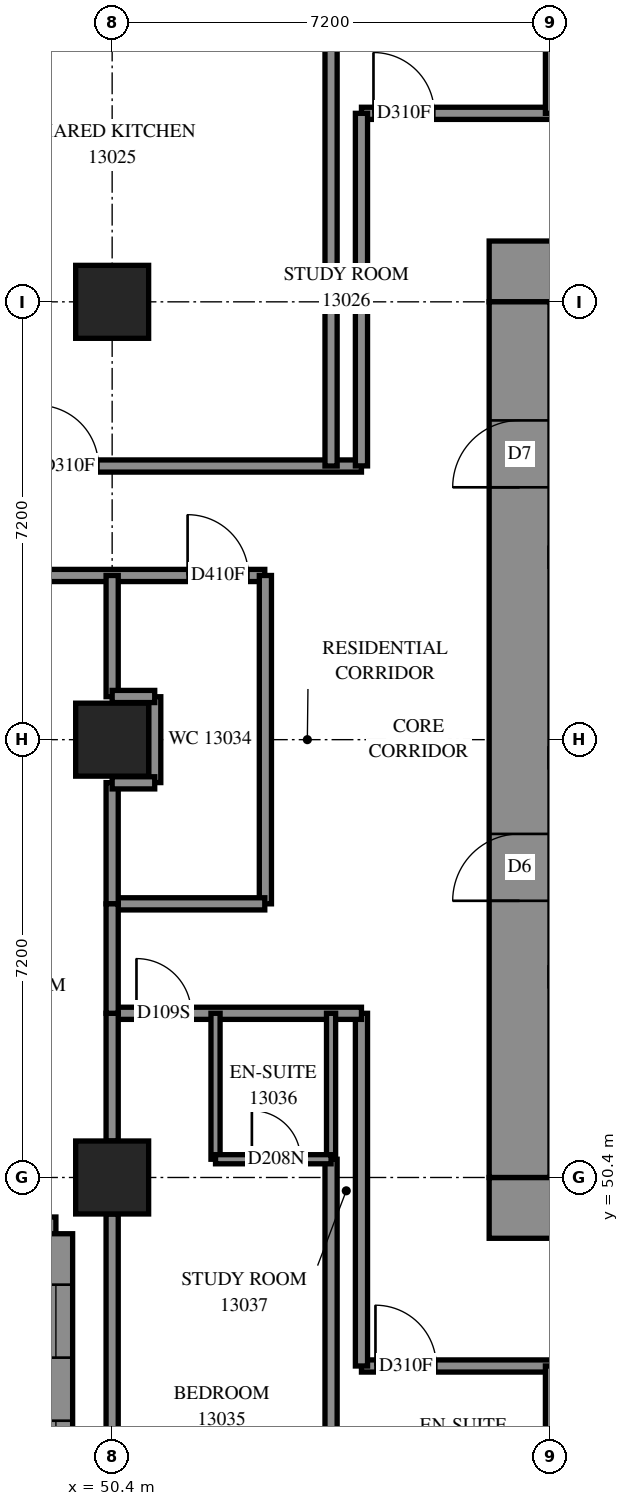
"""IFC4 building model, lengths in metres.
Left out: names, types, materials, properties, quantities, classifications, styles, units other than length and angle.
Written with IfcOpenShell. Run it as: python <this file> out.ifc"""

import sys

from ifc_helpers import new_model, si_unit, direction, frame, frame_2d, origin, origin_2d, place, context, subcontext, project, spatial, polyline, rectangle, outline, extrude, element, fill, save


model = new_model("IFC4")
c1 = context("Model", 3, precision=1e-05, world=origin(), true_north=direction((0.0, 1.0)))
c2 = subcontext(c1, "Body", "Model", "MODEL_VIEW")
j1 = project(units=[si_unit("LENGTHUNIT", "METRE"), si_unit("PLANEANGLEUNIT", "RADIAN")], contexts=[c1])
p1 = place(None, origin())
s1 = spatial("IfcSite", under=j1, at=p1, CompositionType="ELEMENT")
p2 = place(p1, origin())
s2 = spatial("IfcBuilding", under=s1, at=p2, CompositionType="ELEMENT")
p3 = place(p2, frame((0.0, 0.0, 50.8)))
s3 = spatial("IfcBuildingStorey", under=s2, at=p3, CompositionType="ELEMENT", Elevation=50.8)
for number, where, z_axis, x_axis in (
    (1, (50.4, 50.4, 0.0), (0.0, 0.0, 1.0), (1.0, 0.0, 0.0)),
    (2, (50.4, 57.6, 0.0), (0.0, 0.0, 1.0), (1.0, 0.0, 0.0)),
    (3, (50.4, 64.8, 0.0), (0.0, 0.0, 1.0), (1.0, 0.0, 0.0)),
):
    element("IfcColumn", number, at=place(p3, frame(where, z_axis=z_axis, x_axis=x_axis)), inside=s3, PredefinedType="COLUMN", context=c2, shape_type="SweptSolid", body=[
        extrude(rectangle(XDim=1.2, YDim=1.2, at=origin_2d()), origin(), (0.0, 0.0, 1.0), 3.1),
    ])
p4 = place(p3, frame((56.6, 49.9, -0.3), z_axis=(0.0, 0.0, 1.0), x_axis=(1.0, 0.0, 0.0)))
e4 = element("IfcWall", 4, at=p4, inside=s3, PredefinedType="SHEAR", context=c2, shape_type="SweptSolid", body=[
    extrude(rectangle(XDim=16.4, YDim=1.0, at=frame_2d((8.2, 0.0))), origin(), (0.0, 0.0, 1.0), 2.7),
])
p5 = place(p3, frame((56.6, 65.3, -0.3), z_axis=(0.0, 0.0, 1.0), x_axis=(1.0, 0.0, 0.0)))
e5 = element("IfcWall", 5, at=p5, inside=s3, PredefinedType="SHEAR", context=c2, shape_type="SweptSolid", body=[
    extrude(rectangle(XDim=16.4, YDim=1.0, at=frame_2d((8.2, 0.0))), origin(), (0.0, 0.0, 1.0), 2.7),
])
p6 = place(p5, frame((11.0, 0.0, 0.3)))
e6 = element("IfcOpeningElement", 6, at=p6, cuts=e5, PredefinedType="OPENING", context=c2, shape_type="SweptSolid", body=[
    extrude(rectangle(XDim=0.8, YDim=2.1, at=frame_2d((0.4, 1.05))), frame((0.0, 0.51, 0.0), z_axis=(0.0, -1.0, 0.0), x_axis=(1.0, 0.0, 0.0)), (0.0, 0.0, 1.0), 1.02),
])
p7 = place(p3, frame((57.1, 50.4, -0.3), z_axis=(0.0, 0.0, 1.0), x_axis=(0.0, 1.0, 0.0)))
e7 = element("IfcWall", 7, at=p7, inside=s3, PredefinedType="SHEAR", context=c2, shape_type="SweptSolid", body=[
    extrude(rectangle(XDim=14.4, YDim=1.0, at=frame_2d((7.2, 0.0))), origin(), (0.0, 0.0, 1.0), 2.7),
])
p8 = place(p7, frame((4.55, 0.0, 0.3)))
e8 = element("IfcOpeningElement", 8, at=p8, cuts=e7, PredefinedType="OPENING", context=c2, shape_type="SweptSolid", body=[
    extrude(rectangle(XDim=1.1, YDim=2.1, at=frame_2d((0.55, 1.05))), frame((0.0, 0.51, 0.0), z_axis=(0.0, -1.0, 0.0), x_axis=(1.0, 0.0, 0.0)), (0.0, 0.0, 1.0), 1.02),
])
p9 = place(p7, frame((11.35, 0.0, 0.3)))
e9 = element("IfcOpeningElement", 9, at=p9, cuts=e7, PredefinedType="OPENING", context=c2, shape_type="SweptSolid", body=[
    extrude(rectangle(XDim=1.1, YDim=2.1, at=frame_2d((0.55, 1.05))), frame((0.0, 0.51, 0.0), z_axis=(0.0, -1.0, 0.0), x_axis=(1.0, 0.0, 0.0)), (0.0, 0.0, 1.0), 1.02),
])
p10 = place(p3, frame((42.275, 49.475, 0.0), z_axis=(0.0, 0.0, 1.0), x_axis=(1.0, 0.0, 0.0)))
e10 = element("IfcWall", 10, at=p10, inside=s3, PredefinedType="SOLIDWALL", context=c2, shape_type="SweptSolid", body=[
    extrude(outline(polyline([(-0.275, -0.275), (6.925, -0.275), (7.475, 0.275), (0.275, 0.275), (-0.275, -0.275)])), origin(), (0.0, 0.0, 1.0), 3.1),
])
p11 = place(p10, frame((1.325, 0.0, 0.5)))
e11 = element("IfcOpeningElement", 11, at=p11, cuts=e10, PredefinedType="OPENING", context=c2, shape_type="SweptSolid", body=[
    extrude(rectangle(XDim=2.8, YDim=2.45, at=frame_2d((1.4, 1.225))), frame((0.0, 0.285, 0.0), z_axis=(0.0, -1.0, 0.0), x_axis=(1.0, 0.0, 0.0)), (0.0, 0.0, 1.0), 0.57),
])
p12 = place(p10, frame((5.162, 0.0, 0.5)))
e12 = element("IfcOpeningElement", 12, at=p12, cuts=e10, PredefinedType="OPENING", context=c2, shape_type="SweptSolid", body=[
    extrude(rectangle(XDim=1.2, YDim=2.45, at=frame_2d((0.6, 1.225))), frame((0.0, 0.285, 0.0), z_axis=(0.0, -1.0, 0.0), x_axis=(1.0, 0.0, 0.0)), (0.0, 0.0, 1.0), 0.57),
])
p13 = place(p3, frame((49.475, 49.475, 0.0), z_axis=(0.0, 0.0, 1.0), x_axis=(0.0, -1.0, 0.0)))
e13 = element("IfcWall", 13, at=p13, inside=s3, PredefinedType="SOLIDWALL", context=c2, shape_type="SweptSolid", body=[
    extrude(outline(polyline([(0.275, -0.275), (8.587, -0.275), (7.829, 0.275), (-0.275, 0.275), (0.275, -0.275)])), origin(), (0.0, 0.0, 1.0), 3.1),
])
p14 = place(p13, frame((3.075, 0.0, 0.5)))
e14 = element("IfcOpeningElement", 14, at=p14, cuts=e13, PredefinedType="OPENING", context=c2, shape_type="SweptSolid", body=[
    extrude(rectangle(XDim=2.8, YDim=2.45, at=frame_2d((1.4, 1.225))), frame((0.0, 0.285, 0.0), z_axis=(0.0, -1.0, 0.0), x_axis=(1.0, 0.0, 0.0)), (0.0, 0.0, 1.0), 0.57),
])
p15 = place(p13, frame((0.838, 0.0, 0.5)))
e15 = element("IfcOpeningElement", 15, at=p15, cuts=e13, PredefinedType="OPENING", context=c2, shape_type="SweptSolid", body=[
    extrude(rectangle(XDim=1.2, YDim=2.45, at=frame_2d((0.6, 1.225))), frame((0.0, 0.285, 0.0), z_axis=(0.0, -1.0, 0.0), x_axis=(1.0, 0.0, 0.0)), (0.0, 0.0, 1.0), 0.57),
])
p16 = place(p3, frame((28.802, 60.3, 0.0), z_axis=(0.0, 0.0, 1.0), x_axis=(1.0, 0.0, 0.0)))
e16 = element("IfcWall", 16, at=p16, inside=s3, PredefinedType="PARTITIONING", context=c2, shape_type="SweptSolid", body=[
    extrude(rectangle(XDim=24.108, YDim=0.2, at=frame_2d((12.054, 0.0))), origin(), (0.0, 0.0, 1.0), 3.1),
])
p17 = place(p16, frame((11.323, 0.0, 0.0)))
e17 = element("IfcOpeningElement", 17, at=p17, cuts=e16, PredefinedType="OPENING", context=c2, shape_type="SweptSolid", body=[
    extrude(rectangle(XDim=1.0, YDim=2.1, at=frame_2d((0.5, 1.05))), frame((0.0, 0.11, 0.0), z_axis=(0.0, -1.0, 0.0), x_axis=(1.0, 0.0, 0.0)), (0.0, 0.0, 1.0), 0.22),
])
p18 = place(p16, frame((14.798, 0.0, 0.0)))
e18 = element("IfcOpeningElement", 18, at=p18, cuts=e16, PredefinedType="OPENING", context=c2, shape_type="SweptSolid", body=[
    extrude(rectangle(XDim=0.9, YDim=2.1, at=frame_2d((0.45, 1.05))), frame((0.0, 0.11, 0.0), z_axis=(0.0, -1.0, 0.0), x_axis=(1.0, 0.0, 0.0)), (0.0, 0.0, 1.0), 0.22),
])
p19 = place(p16, frame((18.833, 0.0, 0.0)))
e19 = element("IfcOpeningElement", 19, at=p19, cuts=e16, PredefinedType="OPENING", context=c2, shape_type="SweptSolid", body=[
    extrude(rectangle(XDim=1.0, YDim=2.1, at=frame_2d((0.5, 1.05))), frame((0.0, 0.11, 0.0), z_axis=(0.0, -1.0, 0.0), x_axis=(1.0, 0.0, 0.0)), (0.0, 0.0, 1.0), 0.22),
])
p20 = place(p16, frame((22.839, 0.0, 0.0)))
e20 = element("IfcOpeningElement", 20, at=p20, cuts=e16, PredefinedType="OPENING", context=c2, shape_type="SweptSolid", body=[
    extrude(rectangle(XDim=1.0, YDim=2.1, at=frame_2d((0.5, 1.05))), frame((0.0, 0.11, 0.0), z_axis=(0.0, -1.0, 0.0), x_axis=(1.0, 0.0, 0.0)), (0.0, 0.0, 1.0), 0.22),
])
p21 = place(p3, frame((33.3, 62.1, 0.0), z_axis=(0.0, 0.0, 1.0), x_axis=(1.0, 0.0, 0.0)))
e21 = element("IfcWall", 21, at=p21, inside=s3, PredefinedType="PARTITIONING", context=c2, shape_type="SweptSolid", body=[
    extrude(rectangle(XDim=21.2, YDim=0.2, at=frame_2d((10.6, 0.0))), origin(), (0.0, 0.0, 1.0), 3.1),
])
p22 = place(p21, frame((1.395, 0.0, 0.0)))
e22 = element("IfcOpeningElement", 22, at=p22, cuts=e21, PredefinedType="OPENING", context=c2, shape_type="SweptSolid", body=[
    extrude(rectangle(XDim=0.9, YDim=2.1, at=frame_2d((0.45, 1.05))), frame((0.0, 0.11, 0.0), z_axis=(0.0, -1.0, 0.0), x_axis=(1.0, 0.0, 0.0)), (0.0, 0.0, 1.0), 0.22),
])
p23 = place(p21, frame((8.674, 0.0, 0.0)))
e23 = element("IfcOpeningElement", 23, at=p23, cuts=e21, PredefinedType="OPENING", context=c2, shape_type="SweptSolid", body=[
    extrude(rectangle(XDim=1.0, YDim=2.1, at=frame_2d((0.5, 1.05))), frame((0.0, 0.11, 0.0), z_axis=(0.0, -1.0, 0.0), x_axis=(1.0, 0.0, 0.0)), (0.0, 0.0, 1.0), 0.22),
])
p24 = place(p21, frame((15.874, 0.0, 0.0)))
e24 = element("IfcOpeningElement", 24, at=p24, cuts=e21, PredefinedType="OPENING", context=c2, shape_type="SweptSolid", body=[
    extrude(rectangle(XDim=1.0, YDim=2.1, at=frame_2d((0.5, 1.05))), frame((0.0, 0.11, 0.0), z_axis=(0.0, -1.0, 0.0), x_axis=(1.0, 0.0, 0.0)), (0.0, 0.0, 1.0), 0.22),
])
p25 = place(p3, frame((54.5, 67.9, 0.0), z_axis=(0.0, 0.0, 1.0), x_axis=(1.0, 0.0, 0.0)))
e25 = element("IfcWall", 25, at=p25, inside=s3, PredefinedType="PARTITIONING", context=c2, shape_type="SweptSolid", body=[
    extrude(rectangle(XDim=20.6, YDim=0.2, at=frame_2d((10.3, 0.0))), origin(), (0.0, 0.0, 1.0), 3.1),
])
p26 = place(p25, frame((0.198, 0.0, 0.0)))
e26 = element("IfcOpeningElement", 26, at=p26, cuts=e25, PredefinedType="OPENING", context=c2, shape_type="SweptSolid", body=[
    extrude(rectangle(XDim=1.0, YDim=2.1, at=frame_2d((0.5, 1.05))), frame((0.0, 0.11, 0.0), z_axis=(0.0, -1.0, 0.0), x_axis=(1.0, 0.0, 0.0)), (0.0, 0.0, 1.0), 0.22),
])
p27 = place(p25, frame((19.358, 0.0, 0.0)))
e27 = element("IfcOpeningElement", 27, at=p27, cuts=e25, PredefinedType="OPENING", context=c2, shape_type="SweptSolid", body=[
    extrude(rectangle(XDim=1.0, YDim=2.1, at=frame_2d((0.5, 1.05))), frame((0.0, 0.11, 0.0), z_axis=(0.0, -1.0, 0.0), x_axis=(1.0, 0.0, 0.0)), (0.0, 0.0, 1.0), 0.22),
])
p28 = place(p25, frame((6.698, 0.0, 0.0)))
e28 = element("IfcOpeningElement", 28, at=p28, cuts=e25, PredefinedType="OPENING", context=c2, shape_type="SweptSolid", body=[
    extrude(rectangle(XDim=0.9, YDim=2.1, at=frame_2d((0.45, 1.05))), frame((0.0, 0.11, 0.0), z_axis=(0.0, -1.0, 0.0), x_axis=(1.0, 0.0, 0.0)), (0.0, 0.0, 1.0), 0.22),
])
p29 = place(p25, frame((13.884, 0.0, 0.0)))
e29 = element("IfcOpeningElement", 29, at=p29, cuts=e25, PredefinedType="OPENING", context=c2, shape_type="SweptSolid", body=[
    extrude(rectangle(XDim=1.0, YDim=2.1, at=frame_2d((0.5, 1.05))), frame((0.0, 0.11, 0.0), z_axis=(0.0, -1.0, 0.0), x_axis=(1.0, 0.0, 0.0)), (0.0, 0.0, 1.0), 0.22),
])
p30 = place(p3, frame((54.5, 47.3, 0.0), z_axis=(0.0, 0.0, 1.0), x_axis=(1.0, 0.0, 0.0)))
e30 = element("IfcWall", 30, at=p30, inside=s3, PredefinedType="PARTITIONING", context=c2, shape_type="SweptSolid", body=[
    extrude(rectangle(XDim=19.56, YDim=0.2, at=frame_2d((9.78, 0.0))), origin(), (0.0, 0.0, 1.0), 3.1),
])
p31 = place(p30, frame((0.23, 0.0, 0.0)))
e31 = element("IfcOpeningElement", 31, at=p31, cuts=e30, PredefinedType="OPENING", context=c2, shape_type="SweptSolid", body=[
    extrude(rectangle(XDim=1.0, YDim=2.1, at=frame_2d((0.5, 1.05))), frame((0.0, 0.11, 0.0), z_axis=(0.0, -1.0, 0.0), x_axis=(1.0, 0.0, 0.0)), (0.0, 0.0, 1.0), 0.22),
])
p32 = place(p30, frame((5.4, 0.0, 0.0)))
e32 = element("IfcOpeningElement", 32, at=p32, cuts=e30, PredefinedType="OPENING", context=c2, shape_type="SweptSolid", body=[
    extrude(rectangle(XDim=0.9, YDim=2.1, at=frame_2d((0.45, 1.05))), frame((0.0, 0.11, 0.0), z_axis=(0.0, -1.0, 0.0), x_axis=(1.0, 0.0, 0.0)), (0.0, 0.0, 1.0), 0.22),
])
p33 = place(p30, frame((9.001, 0.0, 0.0)))
e33 = element("IfcOpeningElement", 33, at=p33, cuts=e30, PredefinedType="OPENING", context=c2, shape_type="SweptSolid", body=[
    extrude(rectangle(XDim=0.9, YDim=2.1, at=frame_2d((0.45, 1.05))), frame((0.0, 0.11, 0.0), z_axis=(0.0, -1.0, 0.0), x_axis=(1.0, 0.0, 0.0)), (0.0, 0.0, 1.0), 0.22),
])
p34 = place(p30, frame((14.3, 0.0, 0.0)))
e34 = element("IfcOpeningElement", 34, at=p34, cuts=e30, PredefinedType="OPENING", context=c2, shape_type="SweptSolid", body=[
    extrude(rectangle(XDim=0.9, YDim=2.1, at=frame_2d((0.45, 1.05))), frame((0.0, 0.11, 0.0), z_axis=(0.0, -1.0, 0.0), x_axis=(1.0, 0.0, 0.0)), (0.0, 0.0, 1.0), 0.22),
])
p35 = place(p3, frame((54.0, 62.1, 0.0), z_axis=(0.0, 0.0, 1.0), x_axis=(0.0, 1.0, 0.0)))
e35 = element("IfcWall", 35, at=p35, inside=s3, PredefinedType="PARTITIONING", context=c2, shape_type="SweptSolid", body=[
    extrude(rectangle(XDim=10.609, YDim=0.2, at=frame_2d((5.304, 0.0))), origin(), (0.0, 0.0, 1.0), 3.1),
])
p36 = place(p3, frame((54.0, 42.348, 0.0), z_axis=(0.0, 0.0, 1.0), x_axis=(0.0, 1.0, 0.0)))
e36 = element("IfcWall", 36, at=p36, inside=s3, PredefinedType="PARTITIONING", context=c2, shape_type="SweptSolid", body=[
    extrude(rectangle(XDim=8.352, YDim=0.2, at=frame_2d((4.176, 0.0))), origin(), (0.0, 0.0, 1.0), 3.1),
])
p37 = place(p3, frame((50.4, 43.8, 0.0), z_axis=(0.0, 0.0, 1.0), x_axis=(0.0, 1.0, 0.0)))
e37 = element("IfcWall", 37, at=p37, inside=s3, PredefinedType="PARTITIONING", context=c2, shape_type="SweptSolid", body=[
    extrude(rectangle(XDim=6.0, YDim=0.2, at=frame_2d((3.0, 0.0))), origin(), (0.0, 0.0, 1.0), 2.6),
])
p38 = place(p3, frame((54.5, 47.3, 0.0), z_axis=(0.0, 0.0, 1.0), x_axis=(0.0, 1.0, 0.0)))
e38 = element("IfcWall", 38, at=p38, inside=s3, PredefinedType="PARTITIONING", context=c2, shape_type="SweptSolid", body=[
    extrude(rectangle(XDim=5.8, YDim=0.2, at=frame_2d((2.9, 0.0))), origin(), (0.0, 0.0, 1.0), 3.1),
])
p39 = place(p3, frame((54.5, 62.102, 0.0), z_axis=(0.0, 0.0, 1.0), x_axis=(0.0, 1.0, 0.0)))
e39 = element("IfcWall", 39, at=p39, inside=s3, PredefinedType="PARTITIONING", context=c2, shape_type="SweptSolid", body=[
    extrude(rectangle(XDim=5.798, YDim=0.2, at=frame_2d((2.899, 0.0))), origin(), (0.0, 0.0, 1.0), 3.1),
])
p40 = place(p3, frame((52.92, 54.9, 0.0), z_axis=(0.0, 0.0, 1.0), x_axis=(0.0, 1.0, 0.0)))
e40 = element("IfcWall", 40, at=p40, inside=s3, PredefinedType="PARTITIONING", context=c2, shape_type="SweptSolid", body=[
    extrude(rectangle(XDim=5.4, YDim=0.2, at=frame_2d((2.7, 0.0))), origin(), (0.0, 0.0, 1.0), 3.1),
])
p41 = place(p3, frame((50.4, 53.1, 0.0), z_axis=(0.0, 0.0, 1.0), x_axis=(1.0, 0.0, 0.0)))
e41 = element("IfcWall", 41, at=p41, inside=s3, PredefinedType="PARTITIONING", context=c2, shape_type="SweptSolid", body=[
    extrude(rectangle(XDim=4.1, YDim=0.2, at=frame_2d((2.05, 0.0))), origin(), (0.0, 0.0, 1.0), 3.1),
])
p42 = place(p41, frame((0.4, 0.0, 0.0)))
e42 = element("IfcOpeningElement", 42, at=p42, cuts=e41, PredefinedType="OPENING", context=c2, shape_type="SweptSolid", body=[
    extrude(rectangle(XDim=0.9, YDim=2.1, at=frame_2d((0.45, 1.05))), frame((0.0, 0.11, 0.0), z_axis=(0.0, -1.0, 0.0), x_axis=(1.0, 0.0, 0.0)), (0.0, 0.0, 1.0), 0.22),
])
p43 = place(p3, frame((50.4, 54.9, 0.0), z_axis=(0.0, 0.0, 1.0), x_axis=(1.0, 0.0, 0.0)))
e43 = element("IfcWall", 43, at=p43, inside=s3, PredefinedType="PARTITIONING", context=c2, shape_type="SweptSolid", body=[
    extrude(rectangle(XDim=2.51, YDim=0.2, at=frame_2d((1.255, 0.0))), origin(), (0.0, 0.0, 1.0), 3.1),
])
for number, where, z_axis, x_axis in (
    (44, (52.1, 50.7, 0.0), (0.0, 0.0, 1.0), (0.0, 1.0, 0.0)),
    (45, (54.0, 50.7, 0.0), (0.0, 0.0, 1.0), (0.0, 1.0, 0.0)),
    (46, (57.6, 44.9, 0.0), (0.0, 0.0, 1.0), (0.0, 1.0, 0.0)),
    (47, (57.6, 67.9, 0.0), (0.0, 0.0, 1.0), (0.0, 1.0, 0.0)),
):
    element("IfcWall", number, at=place(p3, frame(where, z_axis=z_axis, x_axis=x_axis)), inside=s3, PredefinedType="PARTITIONING", context=c2, shape_type="SweptSolid", body=[
        extrude(rectangle(XDim=2.4, YDim=0.15, at=frame_2d((1.2, 0.0))), origin(), (0.0, 0.0, 1.0), 3.1),
    ])
p44 = place(p3, frame((50.4, 51.0, 0.0), z_axis=(0.0, 0.0, 1.0), x_axis=(0.0, 1.0, 0.0)))
e48 = element("IfcWall", 48, at=p44, inside=s3, PredefinedType="PARTITIONING", context=c2, shape_type="SweptSolid", body=[
    extrude(rectangle(XDim=2.1, YDim=0.2, at=frame_2d((1.05, 0.0))), origin(), (0.0, 0.0, 1.0), 3.1),
])
for number, where, z_axis, x_axis in (
    (49, (50.4, 54.9, 0.0), (0.0, 0.0, 1.0), (0.0, 1.0, 0.0)),
    (50, (50.4, 58.306, 0.0), (0.0, 0.0, 1.0), (0.0, 1.0, 0.0)),
):
    element("IfcWall", number, at=place(p3, frame(where, z_axis=z_axis, x_axis=x_axis)), inside=s3, PredefinedType="PARTITIONING", context=c2, shape_type="SweptSolid", body=[
        extrude(rectangle(XDim=1.994, YDim=0.2, at=frame_2d((0.997, 0.0))), origin(), (0.0, 0.0, 1.0), 3.1),
    ])
p45 = place(p3, frame((52.1, 50.7, 0.0), z_axis=(0.0, 0.0, 1.0), x_axis=(1.0, 0.0, 0.0)))
e51 = element("IfcWall", 51, at=p45, inside=s3, PredefinedType="PARTITIONING", context=c2, shape_type="SweptSolid", body=[
    extrude(rectangle(XDim=1.9, YDim=0.15, at=frame_2d((0.95, 0.0))), origin(), (0.0, 0.0, 1.0), 3.1),
])
p46 = place(p45, frame((0.598, 0.0, 0.0)))
e52 = element("IfcOpeningElement", 52, at=p46, cuts=e51, PredefinedType="OPENING", context=c2, shape_type="SweptSolid", body=[
    extrude(rectangle(XDim=0.8, YDim=2.1, at=frame_2d((0.4, 1.05))), frame((0.0, 0.085, 0.0), z_axis=(0.0, -1.0, 0.0), x_axis=(1.0, 0.0, 0.0)), (0.0, 0.0, 1.0), 0.17),
])
p47 = place(p3, frame((50.4, 53.1, 0.0), z_axis=(0.0, 0.0, 1.0), x_axis=(0.0, 1.0, 0.0)))
e53 = element("IfcWall", 53, at=p47, inside=s3, PredefinedType="PARTITIONING", context=c2, shape_type="SweptSolid", body=[
    extrude(rectangle(XDim=1.8, YDim=0.2, at=frame_2d((0.9, 0.0))), origin(), (0.0, 0.0, 1.0), 3.1),
])
p48 = place(p3, frame((51.1, 56.894, 0.0), z_axis=(0.0, 0.0, 1.0), x_axis=(0.0, 1.0, 0.0)))
e54 = element("IfcWall", 54, at=p48, inside=s3, PredefinedType="PARTITIONING", context=c2, shape_type="SweptSolid", body=[
    extrude(rectangle(XDim=1.412, YDim=0.2, at=frame_2d((0.706, 0.0))), origin(), (0.0, 0.0, 1.0), 3.1),
])
for number, where, z_axis, x_axis in (
    (55, (50.4, 58.31, 0.0), (0.0, 0.0, 1.0), (1.0, 0.0, 0.0)),
    (56, (50.4, 56.89, 0.0), (0.0, 0.0, 1.0), (1.0, 0.0, 0.0)),
):
    element("IfcWall", number, at=place(p3, frame(where, z_axis=z_axis, x_axis=x_axis)), inside=s3, PredefinedType="PARTITIONING", context=c2, shape_type="SweptSolid", body=[
        extrude(rectangle(XDim=0.7, YDim=0.2, at=frame_2d((0.35, 0.0))), origin(), (0.0, 0.0, 1.0), 3.1),
    ])
p49 = place(p14, origin())
e57 = element("IfcWindow", 57, at=p49, inside=s3, PartitioningType="SINGLE_PANEL", PredefinedType="WINDOW", context=c2, shape_type="SweptSolid", body=[
    extrude(rectangle(XDim=2.8, YDim=2.45, at=frame_2d((1.4, 1.225))), frame((0.0, 0.155, 0.0), z_axis=(0.0, -1.0, 0.0), x_axis=(1.0, 0.0, 0.0)), (0.0, 0.0, 1.0), 0.06),
])
fill(e14, e57)
p50 = place(p15, origin())
e58 = element("IfcWindow", 58, at=p50, inside=s3, PartitioningType="SINGLE_PANEL", PredefinedType="WINDOW", context=c2, shape_type="SweptSolid", body=[
    extrude(rectangle(XDim=1.2, YDim=2.45, at=frame_2d((0.6, 1.225))), frame((0.0, 0.155, 0.0), z_axis=(0.0, -1.0, 0.0), x_axis=(1.0, 0.0, 0.0)), (0.0, 0.0, 1.0), 0.06),
])
fill(e15, e58)
p51 = place(p8, origin())
e59 = element("IfcDoor", 59, at=p51, inside=s3, OperationType="DOUBLE_DOOR_SINGLE_SWING", PredefinedType="DOOR", context=c2, shape_type="SweptSolid", body=[
    extrude(rectangle(XDim=1.1, YDim=2.1, at=frame_2d((0.55, 1.05))), frame((0.0, 0.025, 0.0), z_axis=(0.0, -1.0, 0.0), x_axis=(1.0, 0.0, 0.0)), (0.0, 0.0, 1.0), 0.05),
])
fill(e8, e59)
p52 = place(p9, origin())
e60 = element("IfcDoor", 60, at=p52, inside=s3, OperationType="SINGLE_SWING_LEFT", PredefinedType="DOOR", context=c2, shape_type="SweptSolid", body=[
    extrude(rectangle(XDim=1.1, YDim=2.1, at=frame_2d((0.55, 1.05))), frame((0.0, 0.025, 0.0), z_axis=(0.0, -1.0, 0.0), x_axis=(1.0, 0.0, 0.0)), (0.0, 0.0, 1.0), 0.05),
])
fill(e9, e60)
p53 = place(p24, origin())
e61 = element("IfcDoor", 61, at=p53, inside=s3, OperationType="SINGLE_SWING_LEFT", PredefinedType="DOOR", context=c2, shape_type="SweptSolid", body=[
    extrude(rectangle(XDim=1.0, YDim=2.1, at=frame_2d((0.5, 1.05))), frame((0.0, 0.025, 0.0), z_axis=(0.0, -1.0, 0.0), x_axis=(1.0, 0.0, 0.0)), (0.0, 0.0, 1.0), 0.05),
])
fill(e24, e61)
p54 = place(p26, origin())
e62 = element("IfcDoor", 62, at=p54, inside=s3, OperationType="SINGLE_SWING_LEFT", PredefinedType="DOOR", context=c2, shape_type="SweptSolid", body=[
    extrude(rectangle(XDim=1.0, YDim=2.1, at=frame_2d((0.5, 1.05))), frame((0.0, 0.025, 0.0), z_axis=(0.0, -1.0, 0.0), x_axis=(1.0, 0.0, 0.0)), (0.0, 0.0, 1.0), 0.05),
])
fill(e26, e62)
p55 = place(p20, origin())
e63 = element("IfcDoor", 63, at=p55, inside=s3, OperationType="SINGLE_SWING_LEFT", PredefinedType="DOOR", context=c2, shape_type="SweptSolid", body=[
    extrude(rectangle(XDim=1.0, YDim=2.1, at=frame_2d((0.5, 1.05))), frame((0.0, 0.025, 0.0), z_axis=(0.0, -1.0, 0.0), x_axis=(1.0, 0.0, 0.0)), (0.0, 0.0, 1.0), 0.05),
])
fill(e20, e63)
p56 = place(p42, origin())
e64 = element("IfcDoor", 64, at=p56, inside=s3, OperationType="SINGLE_SWING_LEFT", PredefinedType="DOOR", context=c2, shape_type="SweptSolid", body=[
    extrude(rectangle(XDim=0.9, YDim=2.1, at=frame_2d((0.45, 1.05))), frame((0.0, 0.025, 0.0), z_axis=(0.0, -1.0, 0.0), x_axis=(1.0, 0.0, 0.0)), (0.0, 0.0, 1.0), 0.05),
])
fill(e42, e64)
p57 = place(p46, origin())
e65 = element("IfcDoor", 65, at=p57, inside=s3, OperationType="SINGLE_SWING_RIGHT", PredefinedType="DOOR", context=c2, shape_type="SweptSolid", body=[
    extrude(rectangle(XDim=0.8, YDim=2.1, at=frame_2d((0.4, 1.05))), frame((0.0, 0.025, 0.0), z_axis=(0.0, -1.0, 0.0), x_axis=(1.0, 0.0, 0.0)), (0.0, 0.0, 1.0), 0.05),
])
fill(e52, e65)
p58 = place(p31, origin())
e66 = element("IfcDoor", 66, at=p58, inside=s3, OperationType="SINGLE_SWING_RIGHT", PredefinedType="DOOR", context=c2, shape_type="SweptSolid", body=[
    extrude(rectangle(XDim=1.0, YDim=2.1, at=frame_2d((0.5, 1.05))), frame((0.0, 0.025, 0.0), z_axis=(0.0, -1.0, 0.0), x_axis=(1.0, 0.0, 0.0)), (0.0, 0.0, 1.0), 0.05),
])
fill(e31, e66)
save(model, sys.argv[1])
